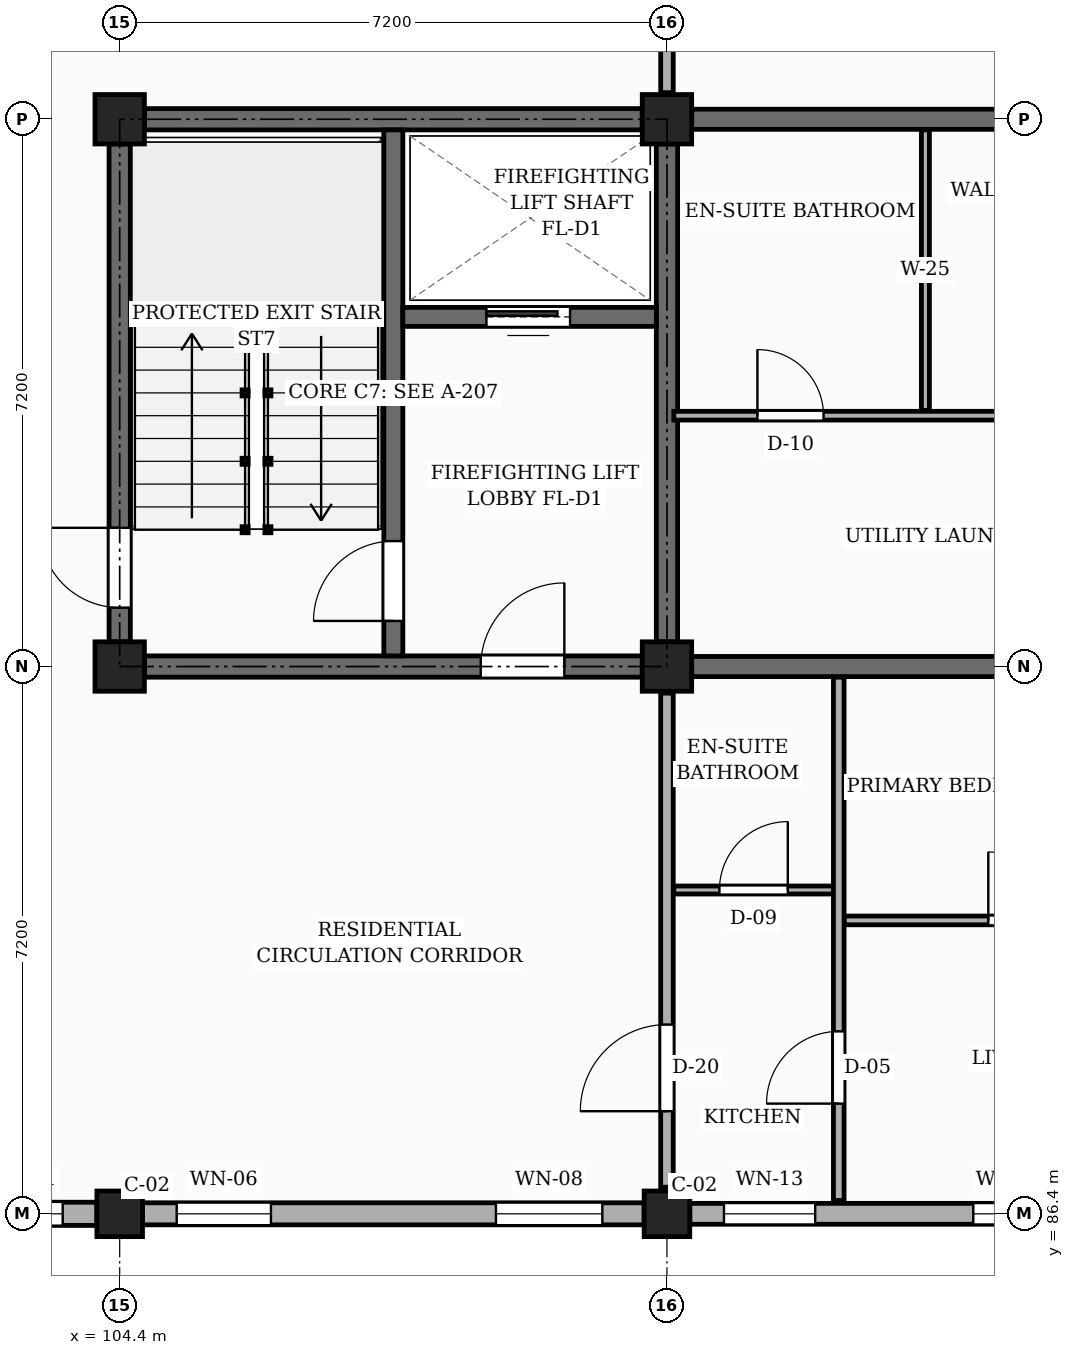
"""IFC4 building model, lengths in metres.
Left out: names, types, materials, properties, quantities, classifications, styles, units other than length and angle.
Written with IfcOpenShell. Run it as: python <this file> out.ifc"""

import sys

from ifc_helpers import new_model, si_unit, direction, frame, frame_2d, origin, origin_2d, place, context, subcontext, project, spatial, rectangle, extrude, element, fill, save


model = new_model("IFC4")
c1 = context("Model", 3, precision=1e-05, world=origin(), true_north=direction((0.0, 1.0)))
c2 = subcontext(c1, "Body", "Model", "MODEL_VIEW")
j1 = project(units=[si_unit("LENGTHUNIT", "METRE"), si_unit("PLANEANGLEUNIT", "RADIAN")], contexts=[c1])
p1 = place(None, origin())
s1 = spatial("IfcSite", under=j1, at=p1, CompositionType="ELEMENT")
p2 = place(p1, origin())
s2 = spatial("IfcBuilding", under=s1, at=p2, CompositionType="ELEMENT")
p3 = place(p2, frame((0.0, 0.0, 4.5)))
s3 = spatial("IfcBuildingStorey", under=s2, at=p3, CompositionType="ELEMENT", Elevation=4.5)
p4 = place(p3, frame((104.4, 86.4, 0.0), z_axis=(0.0, 0.0, 1.0), x_axis=(1.0, 0.0, 0.0)))
e1 = element("IfcColumn", 1, at=p4, inside=s3, PredefinedType="COLUMN", context=c2, shape_type="SweptSolid", body=[
    extrude(rectangle(XDim=0.6, YDim=0.6, at=origin_2d()), origin(), (0.0, 0.0, 1.0), 3.15),
])
for number, where, z_axis, x_axis in (
    (2, (104.4, 93.6, 0.0), (0.0, 0.0, 1.0), (1.0, 0.0, 0.0)),
    (3, (104.4, 100.8, 0.0), (0.0, 0.0, 1.0), (1.0, 0.0, 0.0)),
):
    element("IfcColumn", number, at=place(p3, frame(where, z_axis=z_axis, x_axis=x_axis)), inside=s3, PredefinedType="COLUMN", context=c2, shape_type="SweptSolid", body=[
        extrude(rectangle(XDim=0.65, YDim=0.65, at=origin_2d()), origin(), (0.0, 0.0, 1.0), 3.15),
    ])
p5 = place(p3, frame((111.6, 86.4, 0.0), z_axis=(0.0, 0.0, 1.0), x_axis=(1.0, 0.0, 0.0)))
e4 = element("IfcColumn", 4, at=p5, inside=s3, PredefinedType="COLUMN", context=c2, shape_type="SweptSolid", body=[
    extrude(rectangle(XDim=0.6, YDim=0.6, at=origin_2d()), origin(), (0.0, 0.0, 1.0), 3.15),
])
for number, where, z_axis, x_axis in (
    (5, (111.6, 93.6, 0.0), (0.0, 0.0, 1.0), (1.0, 0.0, 0.0)),
    (6, (111.6, 100.8, 0.0), (0.0, 0.0, 1.0), (1.0, 0.0, 0.0)),
):
    element("IfcColumn", number, at=place(p3, frame(where, z_axis=z_axis, x_axis=x_axis)), inside=s3, PredefinedType="COLUMN", context=c2, shape_type="SweptSolid", body=[
        extrude(rectangle(XDim=0.65, YDim=0.65, at=origin_2d()), origin(), (0.0, 0.0, 1.0), 3.15),
    ])
p6 = place(p3, frame((111.925, 93.6, 0.0), z_axis=(0.0, 0.0, 1.0), x_axis=(1.0, 0.0, 0.0)))
e7 = element("IfcWall", 7, at=p6, inside=s3, PredefinedType="SOLIDWALL", context=c2, shape_type="SweptSolid", body=[
    extrude(rectangle(XDim=6.575, YDim=0.265, at=frame_2d((3.288, 0.0))), origin(), (0.0, 0.0, 1.0), 2.19),
])
p7 = place(p6, frame((4.35, 0.0, 0.0)))
e8 = element("IfcOpeningElement", 8, at=p7, cuts=e7, PredefinedType="OPENING", context=c2, shape_type="SweptSolid", body=[
    extrude(rectangle(XDim=0.98, YDim=2.12, at=frame_2d((0.49, 1.06))), frame((0.0, 0.143, 0.0), z_axis=(0.0, -1.0, 0.0), x_axis=(1.0, 0.0, 0.0)), (0.0, 0.0, 1.0), 0.285),
])
p8 = place(p3, frame((111.925, 100.8, 0.0), z_axis=(0.0, 0.0, 1.0), x_axis=(1.0, 0.0, 0.0)))
e9 = element("IfcWall", 9, at=p8, inside=s3, PredefinedType="SOLIDWALL", context=c2, shape_type="SweptSolid", body=[
    extrude(rectangle(XDim=6.575, YDim=0.265, at=frame_2d((3.288, 0.0))), origin(), (0.0, 0.0, 1.0), 2.19),
])
p9 = place(p3, frame((97.5, 86.4, 0.0), z_axis=(0.0, 0.0, 1.0), x_axis=(1.0, 0.0, 0.0)))
e10 = element("IfcWall", 10, at=p9, inside=s3, PredefinedType="SOLIDWALL", context=c2, shape_type="SweptSolid", body=[
    extrude(rectangle(XDim=6.6, YDim=0.305, at=frame_2d((3.3, 0.0))), origin(), (0.0, 0.0, 1.0), 2.46),
])
p10 = place(p9, frame((0.44, 0.0, 0.78)))
e11 = element("IfcOpeningElement", 11, at=p10, cuts=e10, PredefinedType="OPENING", context=c2, shape_type="SweptSolid", body=[
    extrude(rectangle(XDim=1.0, YDim=1.15, at=frame_2d((0.5, 0.575))), frame((0.0, 0.163, 0.0), z_axis=(0.0, -1.0, 0.0), x_axis=(1.0, 0.0, 0.0)), (0.0, 0.0, 1.0), 0.325),
])
p11 = place(p9, frame((2.69, 0.0, 0.78)))
e12 = element("IfcOpeningElement", 12, at=p11, cuts=e10, PredefinedType="OPENING", context=c2, shape_type="SweptSolid", body=[
    extrude(rectangle(XDim=1.16, YDim=1.15, at=frame_2d((0.58, 0.575))), frame((0.0, 0.163, 0.0), z_axis=(0.0, -1.0, 0.0), x_axis=(1.0, 0.0, 0.0)), (0.0, 0.0, 1.0), 0.325),
])
p12 = place(p9, frame((5.11, 0.0, 0.78)))
e13 = element("IfcOpeningElement", 13, at=p12, cuts=e10, PredefinedType="OPENING", context=c2, shape_type="SweptSolid", body=[
    extrude(rectangle(XDim=1.04, YDim=1.26, at=frame_2d((0.52, 0.63))), frame((0.0, 0.163, 0.0), z_axis=(0.0, -1.0, 0.0), x_axis=(1.0, 0.0, 0.0)), (0.0, 0.0, 1.0), 0.325),
])
p13 = place(p3, frame((104.7, 86.4, 0.0), z_axis=(0.0, 0.0, 1.0), x_axis=(1.0, 0.0, 0.0)))
e14 = element("IfcWall", 14, at=p13, inside=s3, PredefinedType="SOLIDWALL", context=c2, shape_type="SweptSolid", body=[
    extrude(rectangle(XDim=6.6, YDim=0.29, at=frame_2d((3.3, 0.0))), origin(), (0.0, 0.0, 1.0), 2.46),
])
p14 = place(p13, frame((0.45, 0.0, 0.78)))
e15 = element("IfcOpeningElement", 15, at=p14, cuts=e14, PredefinedType="OPENING", context=c2, shape_type="SweptSolid", body=[
    extrude(rectangle(XDim=1.24, YDim=1.15, at=frame_2d((0.62, 0.575))), frame((0.0, 0.155, 0.0), z_axis=(0.0, -1.0, 0.0), x_axis=(1.0, 0.0, 0.0)), (0.0, 0.0, 1.0), 0.31),
])
p15 = place(p13, frame((4.65, 0.0, 0.78)))
e16 = element("IfcOpeningElement", 16, at=p15, cuts=e14, PredefinedType="OPENING", context=c2, shape_type="SweptSolid", body=[
    extrude(rectangle(XDim=1.4, YDim=1.15, at=frame_2d((0.7, 0.575))), frame((0.0, 0.155, 0.0), z_axis=(0.0, -1.0, 0.0), x_axis=(1.0, 0.0, 0.0)), (0.0, 0.0, 1.0), 0.31),
])
p16 = place(p3, frame((111.9, 86.4, 0.0), z_axis=(0.0, 0.0, 1.0), x_axis=(1.0, 0.0, 0.0)))
e17 = element("IfcWall", 17, at=p16, inside=s3, PredefinedType="SOLIDWALL", context=c2, shape_type="SweptSolid", body=[
    extrude(rectangle(XDim=6.6, YDim=0.275, at=frame_2d((3.3, 0.0))), origin(), (0.0, 0.0, 1.0), 2.46),
])
p17 = place(p16, frame((0.45, 0.0, 0.78)))
e18 = element("IfcOpeningElement", 18, at=p17, cuts=e17, PredefinedType="OPENING", context=c2, shape_type="SweptSolid", body=[
    extrude(rectangle(XDim=1.2, YDim=1.26, at=frame_2d((0.6, 0.63))), frame((0.0, 0.147, 0.0), z_axis=(0.0, -1.0, 0.0), x_axis=(1.0, 0.0, 0.0)), (0.0, 0.0, 1.0), 0.295),
])
p18 = place(p16, frame((3.73, 0.0, 0.78)))
e19 = element("IfcOpeningElement", 19, at=p18, cuts=e17, PredefinedType="OPENING", context=c2, shape_type="SweptSolid", body=[
    extrude(rectangle(XDim=0.96, YDim=1.26, at=frame_2d((0.48, 0.63))), frame((0.0, 0.147, 0.0), z_axis=(0.0, -1.0, 0.0), x_axis=(1.0, 0.0, 0.0)), (0.0, 0.0, 1.0), 0.295),
])
p19 = place(p3, frame((104.4, 93.925, 0.0), z_axis=(0.0, 0.0, 1.0), x_axis=(0.0, 1.0, 0.0)))
e20 = element("IfcWall", 20, at=p19, inside=s3, PredefinedType="SHEAR", context=c2, shape_type="SweptSolid", body=[
    extrude(rectangle(XDim=6.55, YDim=0.28, at=frame_2d((3.275, 0.0))), origin(), (0.0, 0.0, 1.0), 2.89),
])
p20 = place(p19, frame((0.45, 0.0, 0.0)))
e21 = element("IfcOpeningElement", 21, at=p20, cuts=e20, PredefinedType="OPENING", context=c2, shape_type="SweptSolid", body=[
    extrude(rectangle(XDim=1.05, YDim=2.15, at=frame_2d((0.525, 1.075))), frame((0.0, 0.15, 0.0), z_axis=(0.0, -1.0, 0.0), x_axis=(1.0, 0.0, 0.0)), (0.0, 0.0, 1.0), 0.3),
])
p21 = place(p3, frame((104.725, 100.8, 0.0), z_axis=(0.0, 0.0, 1.0), x_axis=(1.0, 0.0, 0.0)))
e22 = element("IfcWall", 22, at=p21, inside=s3, PredefinedType="SHEAR", context=c2, shape_type="SweptSolid", body=[
    extrude(rectangle(XDim=6.55, YDim=0.28, at=frame_2d((3.275, 0.0))), origin(), (0.0, 0.0, 1.0), 2.89),
])
p22 = place(p3, frame((111.6, 93.925, 0.0), z_axis=(0.0, 0.0, 1.0), x_axis=(0.0, 1.0, 0.0)))
e23 = element("IfcWall", 23, at=p22, inside=s3, PredefinedType="SHEAR", context=c2, shape_type="SweptSolid", body=[
    extrude(rectangle(XDim=6.55, YDim=0.28, at=frame_2d((3.275, 0.0))), origin(), (0.0, 0.0, 1.0), 2.89),
])
p23 = place(p3, frame((104.725, 93.6, 0.0), z_axis=(0.0, 0.0, 1.0), x_axis=(1.0, 0.0, 0.0)))
e24 = element("IfcWall", 24, at=p23, inside=s3, PredefinedType="SHEAR", context=c2, shape_type="SweptSolid", body=[
    extrude(rectangle(XDim=6.55, YDim=0.28, at=frame_2d((3.275, 0.0))), origin(), (0.0, 0.0, 1.0), 2.89),
])
p24 = place(p23, frame((4.425, 0.0, 0.0)))
e25 = element("IfcOpeningElement", 25, at=p24, cuts=e24, PredefinedType="OPENING", context=c2, shape_type="SweptSolid", body=[
    extrude(rectangle(XDim=1.1, YDim=2.15, at=frame_2d((0.55, 1.075))), frame((0.0, 0.15, 0.0), z_axis=(0.0, -1.0, 0.0), x_axis=(1.0, 0.0, 0.0)), (0.0, 0.0, 1.0), 0.3),
])
p25 = place(p3, frame((108.0, 93.74, 0.0), z_axis=(0.0, 0.0, 1.0), x_axis=(0.0, 1.0, 0.0)))
e26 = element("IfcWall", 26, at=p25, inside=s3, PredefinedType="SHEAR", context=c2, shape_type="SweptSolid", body=[
    extrude(rectangle(XDim=6.92, YDim=0.25, at=frame_2d((3.46, 0.0))), origin(), (0.0, 0.0, 1.0), 2.89),
])
p26 = place(p25, frame((0.46, 0.0, 0.0)))
e27 = element("IfcOpeningElement", 27, at=p26, cuts=e26, PredefinedType="OPENING", context=c2, shape_type="SweptSolid", body=[
    extrude(rectangle(XDim=1.05, YDim=2.15, at=frame_2d((0.525, 1.075))), frame((0.0, 0.135, 0.0), z_axis=(0.0, -1.0, 0.0), x_axis=(1.0, 0.0, 0.0)), (0.0, 0.0, 1.0), 0.27),
])
p27 = place(p3, frame((108.125, 98.2, 0.0), z_axis=(0.0, 0.0, 1.0), x_axis=(1.0, 0.0, 0.0)))
e28 = element("IfcWall", 28, at=p27, inside=s3, PredefinedType="SHEAR", context=c2, shape_type="SweptSolid", body=[
    extrude(rectangle(XDim=3.335, YDim=0.25, at=frame_2d((1.667, 0.0))), origin(), (0.0, 0.0, 1.0), 2.89),
])
p28 = place(p27, frame((1.1, 0.0, 0.0)))
e29 = element("IfcOpeningElement", 29, at=p28, cuts=e28, PredefinedType="OPENING", context=c2, shape_type="SweptSolid", body=[
    extrude(rectangle(XDim=1.1, YDim=2.2, at=frame_2d((0.55, 1.1))), frame((0.0, 0.135, 0.0), z_axis=(0.0, -1.0, 0.0), x_axis=(1.0, 0.0, 0.0)), (0.0, 0.0, 1.0), 0.27),
])
p29 = place(p3, frame((111.6, 86.75, 0.0), z_axis=(0.0, 0.0, 1.0), x_axis=(0.0, 1.0, 0.0)))
e30 = element("IfcWall", 30, at=p29, inside=s3, PredefinedType="PARTITIONING", context=c2, shape_type="SweptSolid", body=[
    extrude(rectangle(XDim=6.5, YDim=0.165, at=frame_2d((3.25, 0.0))), origin(), (0.0, 0.0, 1.0), 2.24),
])
p30 = place(p29, frame((1.0, 0.0, 0.0)))
e31 = element("IfcOpeningElement", 31, at=p30, cuts=e30, PredefinedType="OPENING", context=c2, shape_type="SweptSolid", body=[
    extrude(rectangle(XDim=1.14, YDim=2.18, at=frame_2d((0.57, 1.09))), frame((0.0, 0.093, 0.0), z_axis=(0.0, -1.0, 0.0), x_axis=(1.0, 0.0, 0.0)), (0.0, 0.0, 1.0), 0.185),
])
p31 = place(p3, frame((111.6, 101.15, 0.0), z_axis=(0.0, 0.0, 1.0), x_axis=(0.0, 1.0, 0.0)))
e32 = element("IfcWall", 32, at=p31, inside=s3, PredefinedType="PARTITIONING", context=c2, shape_type="SweptSolid", body=[
    extrude(rectangle(XDim=6.5, YDim=0.165, at=frame_2d((3.25, 0.0))), origin(), (0.0, 0.0, 1.0), 2.24),
])
p32 = place(p31, frame((1.1, 0.0, 0.0)))
e33 = element("IfcOpeningElement", 33, at=p32, cuts=e32, PredefinedType="OPENING", context=c2, shape_type="SweptSolid", body=[
    extrude(rectangle(XDim=1.0, YDim=2.15, at=frame_2d((0.5, 1.075))), frame((0.0, 0.093, 0.0), z_axis=(0.0, -1.0, 0.0), x_axis=(1.0, 0.0, 0.0)), (0.0, 0.0, 1.0), 0.185),
])
p33 = place(p3, frame((113.93, 90.26, 0.0), z_axis=(0.0, 0.0, 1.0), x_axis=(1.0, 0.0, 0.0)))
e34 = element("IfcWall", 34, at=p33, inside=s3, PredefinedType="PARTITIONING", context=c2, shape_type="SweptSolid", body=[
    extrude(rectangle(XDim=4.695, YDim=0.115, at=frame_2d((2.348, 0.0))), origin(), (0.0, 0.0, 1.0), 2.325),
])
p34 = place(p33, frame((1.897, 0.0, 0.0)))
e35 = element("IfcOpeningElement", 35, at=p34, cuts=e34, PredefinedType="OPENING", context=c2, shape_type="SweptSolid", body=[
    extrude(rectangle(XDim=0.9, YDim=2.1, at=frame_2d((0.45, 1.05))), frame((0.0, 0.067, 0.0), z_axis=(0.0, -1.0, 0.0), x_axis=(1.0, 0.0, 0.0)), (0.0, 0.0, 1.0), 0.135),
])
p35 = place(p3, frame((111.69, 90.66, 0.0), z_axis=(0.0, 0.0, 1.0), x_axis=(1.0, 0.0, 0.0)))
e36 = element("IfcWall", 36, at=p35, inside=s3, PredefinedType="PARTITIONING", context=c2, shape_type="SweptSolid", body=[
    extrude(rectangle(XDim=2.1, YDim=0.105, at=frame_2d((1.05, 0.0))), origin(), (0.0, 0.0, 1.0), 2.325),
])
p36 = place(p35, frame((0.6, 0.0, 0.0)))
e37 = element("IfcOpeningElement", 37, at=p36, cuts=e36, PredefinedType="OPENING", context=c2, shape_type="SweptSolid", body=[
    extrude(rectangle(XDim=0.9, YDim=2.05, at=frame_2d((0.45, 1.025))), frame((0.0, 0.062, 0.0), z_axis=(0.0, -1.0, 0.0), x_axis=(1.0, 0.0, 0.0)), (0.0, 0.0, 1.0), 0.125),
])
p37 = place(p3, frame((113.86, 86.575, 0.0), z_axis=(0.0, 0.0, 1.0), x_axis=(0.0, 1.0, 0.0)))
e38 = element("IfcWall", 38, at=p37, inside=s3, PredefinedType="PARTITIONING", context=c2, shape_type="SweptSolid", body=[
    extrude(rectangle(XDim=6.885, YDim=0.14, at=frame_2d((3.442, 0.0))), origin(), (0.0, 0.0, 1.0), 2.325),
])
p38 = place(p37, frame((1.275, 0.0, 0.0)))
e39 = element("IfcOpeningElement", 39, at=p38, cuts=e38, PredefinedType="OPENING", context=c2, shape_type="SweptSolid", body=[
    extrude(rectangle(XDim=0.95, YDim=2.1, at=frame_2d((0.475, 1.05))), frame((0.0, 0.08, 0.0), z_axis=(0.0, -1.0, 0.0), x_axis=(1.0, 0.0, 0.0)), (0.0, 0.0, 1.0), 0.16),
])
p39 = place(p3, frame((111.69, 96.9, 0.0), z_axis=(0.0, 0.0, 1.0), x_axis=(1.0, 0.0, 0.0)))
e40 = element("IfcWall", 40, at=p39, inside=s3, PredefinedType="PARTITIONING", context=c2, shape_type="SweptSolid", body=[
    extrude(rectangle(XDim=6.935, YDim=0.115, at=frame_2d((3.468, 0.0))), origin(), (0.0, 0.0, 1.0), 2.325),
])
p40 = place(p39, frame((1.1, 0.0, 0.0)))
e41 = element("IfcOpeningElement", 41, at=p40, cuts=e40, PredefinedType="OPENING", context=c2, shape_type="SweptSolid", body=[
    extrude(rectangle(XDim=0.87, YDim=2.05, at=frame_2d((0.435, 1.025))), frame((0.0, 0.067, 0.0), z_axis=(0.0, -1.0, 0.0), x_axis=(1.0, 0.0, 0.0)), (0.0, 0.0, 1.0), 0.135),
])
p41 = place(p39, frame((4.5, 0.0, 0.0)))
e42 = element("IfcOpeningElement", 42, at=p41, cuts=e40, PredefinedType="OPENING", context=c2, shape_type="SweptSolid", body=[
    extrude(rectangle(XDim=0.88, YDim=2.08, at=frame_2d((0.44, 1.04))), frame((0.0, 0.067, 0.0), z_axis=(0.0, -1.0, 0.0), x_axis=(1.0, 0.0, 0.0)), (0.0, 0.0, 1.0), 0.135),
])
p42 = place(p3, frame((115.0, 96.97, 0.0), z_axis=(0.0, 0.0, 1.0), x_axis=(0.0, 1.0, 0.0)))
e43 = element("IfcWall", 43, at=p42, inside=s3, PredefinedType="PARTITIONING", context=c2, shape_type="SweptSolid", body=[
    extrude(rectangle(XDim=3.69, YDim=0.105, at=frame_2d((1.845, 0.0))), origin(), (0.0, 0.0, 1.0), 2.325),
])
p43 = place(p12, origin())
e44 = element("IfcWindow", 44, at=p43, inside=s3, PartitioningType="SINGLE_PANEL", PredefinedType="WINDOW", context=c2, shape_type="SweptSolid", body=[
    extrude(rectangle(XDim=1.04, YDim=1.26, at=frame_2d((0.52, 0.63))), frame((0.0, 0.03, 0.0), z_axis=(0.0, -1.0, 0.0), x_axis=(1.0, 0.0, 0.0)), (0.0, 0.0, 1.0), 0.06),
])
fill(e13, e44)
p44 = place(p14, origin())
e45 = element("IfcWindow", 45, at=p44, inside=s3, PartitioningType="SINGLE_PANEL", PredefinedType="WINDOW", context=c2, shape_type="SweptSolid", body=[
    extrude(rectangle(XDim=1.24, YDim=1.15, at=frame_2d((0.62, 0.575))), frame((0.0, 0.03, 0.0), z_axis=(0.0, -1.0, 0.0), x_axis=(1.0, 0.0, 0.0)), (0.0, 0.0, 1.0), 0.06),
])
fill(e15, e45)
p45 = place(p15, origin())
e46 = element("IfcWindow", 46, at=p45, inside=s3, PartitioningType="SINGLE_PANEL", PredefinedType="WINDOW", context=c2, shape_type="SweptSolid", body=[
    extrude(rectangle(XDim=1.4, YDim=1.15, at=frame_2d((0.7, 0.575))), frame((0.0, 0.03, 0.0), z_axis=(0.0, -1.0, 0.0), x_axis=(1.0, 0.0, 0.0)), (0.0, 0.0, 1.0), 0.06),
])
fill(e16, e46)
p46 = place(p17, origin())
e47 = element("IfcWindow", 47, at=p46, inside=s3, PartitioningType="SINGLE_PANEL", PredefinedType="WINDOW", context=c2, shape_type="SweptSolid", body=[
    extrude(rectangle(XDim=1.2, YDim=1.26, at=frame_2d((0.6, 0.63))), frame((0.0, 0.03, 0.0), z_axis=(0.0, -1.0, 0.0), x_axis=(1.0, 0.0, 0.0)), (0.0, 0.0, 1.0), 0.06),
])
fill(e18, e47)
p47 = place(p18, origin())
e48 = element("IfcWindow", 48, at=p47, inside=s3, PartitioningType="SINGLE_PANEL", PredefinedType="WINDOW", context=c2, shape_type="SweptSolid", body=[
    extrude(rectangle(XDim=0.96, YDim=1.26, at=frame_2d((0.48, 0.63))), frame((0.0, 0.03, 0.0), z_axis=(0.0, -1.0, 0.0), x_axis=(1.0, 0.0, 0.0)), (0.0, 0.0, 1.0), 0.06),
])
fill(e19, e48)
p48 = place(p20, origin())
e49 = element("IfcDoor", 49, at=p48, inside=s3, OperationType="SINGLE_SWING_RIGHT", PredefinedType="DOOR", context=c2, shape_type="SweptSolid", body=[
    extrude(rectangle(XDim=1.05, YDim=2.15, at=frame_2d((0.525, 1.075))), frame((0.0, 0.025, 0.0), z_axis=(0.0, -1.0, 0.0), x_axis=(1.0, 0.0, 0.0)), (0.0, 0.0, 1.0), 0.05),
])
fill(e21, e49)
p49 = place(p24, frame((1.1, 0.0, 0.0), z_axis=(0.0, 0.0, 1.0), x_axis=(-1.0, 0.0, 0.0)))
e50 = element("IfcDoor", 50, at=p49, inside=s3, OperationType="SINGLE_SWING_RIGHT", PredefinedType="DOOR", context=c2, shape_type="SweptSolid", body=[
    extrude(rectangle(XDim=1.1, YDim=2.15, at=frame_2d((0.55, 1.075))), frame((0.0, 0.025, 0.0), z_axis=(0.0, -1.0, 0.0), x_axis=(1.0, 0.0, 0.0)), (0.0, 0.0, 1.0), 0.05),
])
fill(e25, e50)
p50 = place(p26, origin())
e51 = element("IfcDoor", 51, at=p50, inside=s3, OperationType="SINGLE_SWING_LEFT", PredefinedType="DOOR", context=c2, shape_type="SweptSolid", body=[
    extrude(rectangle(XDim=1.05, YDim=2.15, at=frame_2d((0.525, 1.075))), frame((0.0, 0.025, 0.0), z_axis=(0.0, -1.0, 0.0), x_axis=(1.0, 0.0, 0.0)), (0.0, 0.0, 1.0), 0.05),
])
fill(e27, e51)
p51 = place(p28, origin())
e52 = element("IfcDoor", 52, at=p51, inside=s3, OperationType="SLIDING_TO_LEFT", PredefinedType="DOOR", context=c2, shape_type="SweptSolid", body=[
    extrude(rectangle(XDim=1.1, YDim=2.2, at=frame_2d((0.55, 1.1))), frame((0.0, 0.025, 0.0), z_axis=(0.0, -1.0, 0.0), x_axis=(1.0, 0.0, 0.0)), (0.0, 0.0, 1.0), 0.05),
])
fill(e29, e52)
p52 = place(p30, origin())
e53 = element("IfcDoor", 53, at=p52, inside=s3, OperationType="SINGLE_SWING_LEFT", PredefinedType="DOOR", context=c2, shape_type="SweptSolid", body=[
    extrude(rectangle(XDim=1.14, YDim=2.18, at=frame_2d((0.57, 1.09))), frame((0.0, 0.025, 0.0), z_axis=(0.0, -1.0, 0.0), x_axis=(1.0, 0.0, 0.0)), (0.0, 0.0, 1.0), 0.05),
])
fill(e31, e53)
p53 = place(p34, origin())
e54 = element("IfcDoor", 54, at=p53, inside=s3, OperationType="SINGLE_SWING_LEFT", PredefinedType="DOOR", context=c2, shape_type="SweptSolid", body=[
    extrude(rectangle(XDim=0.9, YDim=2.1, at=frame_2d((0.45, 1.05))), frame((0.0, 0.025, 0.0), z_axis=(0.0, -1.0, 0.0), x_axis=(1.0, 0.0, 0.0)), (0.0, 0.0, 1.0), 0.05),
])
fill(e35, e54)
p54 = place(p36, origin())
e55 = element("IfcDoor", 55, at=p54, inside=s3, OperationType="SINGLE_SWING_RIGHT", PredefinedType="DOOR", context=c2, shape_type="SweptSolid", body=[
    extrude(rectangle(XDim=0.9, YDim=2.05, at=frame_2d((0.45, 1.025))), frame((0.0, 0.025, 0.0), z_axis=(0.0, -1.0, 0.0), x_axis=(1.0, 0.0, 0.0)), (0.0, 0.0, 1.0), 0.05),
])
fill(e37, e55)
p55 = place(p38, origin())
e56 = element("IfcDoor", 56, at=p55, inside=s3, OperationType="SINGLE_SWING_LEFT", PredefinedType="DOOR", context=c2, shape_type="SweptSolid", body=[
    extrude(rectangle(XDim=0.95, YDim=2.1, at=frame_2d((0.475, 1.05))), frame((0.0, 0.025, 0.0), z_axis=(0.0, -1.0, 0.0), x_axis=(1.0, 0.0, 0.0)), (0.0, 0.0, 1.0), 0.05),
])
fill(e39, e56)
p56 = place(p40, origin())
e57 = element("IfcDoor", 57, at=p56, inside=s3, OperationType="SINGLE_SWING_LEFT", PredefinedType="DOOR", context=c2, shape_type="SweptSolid", body=[
    extrude(rectangle(XDim=0.87, YDim=2.05, at=frame_2d((0.435, 1.025))), frame((0.0, 0.025, 0.0), z_axis=(0.0, -1.0, 0.0), x_axis=(1.0, 0.0, 0.0)), (0.0, 0.0, 1.0), 0.05),
])
fill(e41, e57)
save(model, sys.argv[1])
